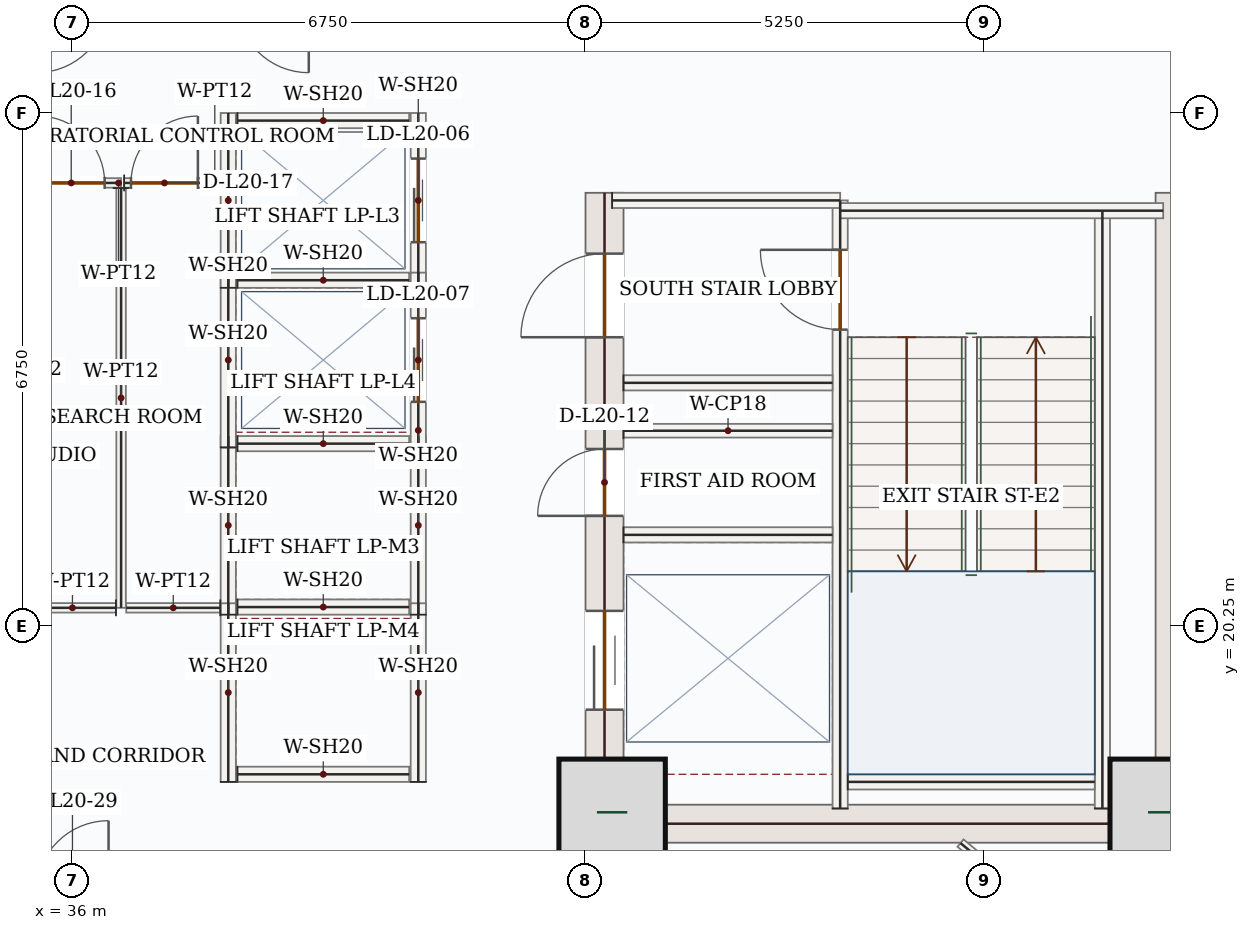
"""IFC4 building model, lengths in metres.
Left out: names, types, materials, properties, quantities, classifications, styles, units other than length and angle.
Written with IfcOpenShell. Run it as: python <this file> out.ifc"""

import sys

from ifc_helpers import new_model, si_unit, direction, frame, frame_2d, origin, origin_2d, place, context, subcontext, project, spatial, rectangle, extrude, source, transform, mapped, element, fill, save


model = new_model("IFC4")
c1 = context("Model", 3, precision=1e-05, world=origin(), true_north=direction((0.0, 1.0)))
c2 = subcontext(c1, "Body", "Model", "MODEL_VIEW")
j1 = project(units=[si_unit("LENGTHUNIT", "METRE"), si_unit("PLANEANGLEUNIT", "RADIAN")], contexts=[c1])
p1 = place(None, origin())
s1 = spatial("IfcSite", under=j1, at=p1, CompositionType="ELEMENT")
p2 = place(p1, origin())
s2 = spatial("IfcBuilding", under=s1, at=p2, CompositionType="ELEMENT")
p3 = place(p2, frame((0.0, 0.0, 92.1)))
s3 = spatial("IfcBuildingStorey", under=s2, at=p3, CompositionType="ELEMENT", Elevation=92.1)
p4 = place(p3, frame((43.0, 17.4, 0.0), z_axis=(0.0, 0.0, 1.0), x_axis=(0.0, 1.0, 0.0)))
e1 = element("IfcWall", 1, at=p4, inside=s3, PredefinedType="SHEAR", context=c2, shape_type="SweptSolid", body=[
    extrude(rectangle(XDim=8.55, YDim=0.5, at=frame_2d((4.275, 0.0))), origin(), (0.0, 0.0, 1.0), 3.95),
])
p5 = place(p4, frame((6.65, 0.0, 0.0)))
e2 = element("IfcOpeningElement", 2, at=p5, cuts=e1, PredefinedType="OPENING", context=c2, shape_type="SweptSolid", body=[
    extrude(rectangle(XDim=1.1, YDim=2.2, at=frame_2d((0.55, 1.1))), frame((0.0, 0.26, 0.0), z_axis=(0.0, -1.0, 0.0), x_axis=(1.0, 0.0, 0.0)), (0.0, 0.0, 1.0), 0.52),
])
p6 = place(p4, frame((1.75, 0.0, 0.0)))
e3 = element("IfcOpeningElement", 3, at=p6, cuts=e1, PredefinedType="OPENING", context=c2, shape_type="SweptSolid", body=[
    extrude(rectangle(XDim=1.3, YDim=2.2, at=frame_2d((0.65, 1.1))), frame((0.0, 0.26, 0.0), z_axis=(0.0, -1.0, 0.0), x_axis=(1.0, 0.0, 0.0)), (0.0, 0.0, 1.0), 0.52),
])
p7 = place(p4, frame((4.3, 0.0, 0.0)))
e4 = element("IfcOpeningElement", 4, at=p7, cuts=e1, PredefinedType="OPENING", context=c2, shape_type="SweptSolid", body=[
    extrude(rectangle(XDim=0.88, YDim=2.1, at=frame_2d((0.44, 1.05))), frame((0.0, 0.26, 0.0), z_axis=(0.0, -1.0, 0.0), x_axis=(1.0, 0.0, 0.0)), (0.0, 0.0, 1.0), 0.52),
])
m1 = source(origin(), c2, "Body", "SweptSolid", [
    extrude(rectangle(XDim=8.55, YDim=0.5, at=frame_2d((4.275, 0.0))), origin(), (0.0, 0.0, 1.0), 3.95),
])
p8 = place(p3, frame((50.5, 17.4, 0.0), z_axis=(0.0, 0.0, 1.0), x_axis=(0.0, 1.0, 0.0)))
e5 = element("IfcWall", 5, at=p8, inside=s3, PredefinedType="SHEAR", context=c2, shape_type="MappedRepresentation", body=[
    mapped(m1, transform((0.0, 0.0, 0.0), x_axis=(1.0, 0.0, 0.0), y_axis=(0.0, 1.0, 0.0), z_axis=(0.0, 0.0, 1.0), scale=1.0)),
])
m2 = source(origin(), c2, "Body", "SweptSolid", [
    extrude(rectangle(XDim=7.0, YDim=0.5, at=frame_2d((3.5, 0.0))), origin(), (0.0, 0.0, 1.0), 3.95),
])
p9 = place(p3, frame((43.25, 17.65, 0.0), z_axis=(0.0, 0.0, 1.0), x_axis=(1.0, 0.0, 0.0)))
e6 = element("IfcWall", 6, at=p9, inside=s3, PredefinedType="SHEAR", context=c2, shape_type="MappedRepresentation", body=[
    mapped(m2, transform((0.0, 0.0, 0.0), x_axis=(1.0, 0.0, 0.0), y_axis=(0.0, 1.0, 0.0), z_axis=(0.0, 0.0, 1.0), scale=1.0)),
])
m3 = source(origin(), c2, "Body", "SweptSolid", [
    extrude(rectangle(XDim=1.4, YDim=1.4, at=origin_2d()), origin(), (0.0, 0.0, 1.0), 4.2),
])
for number, where, z_axis, x_axis in (
    (7, (43.1, 17.8, 0.0), (0.0, 0.0, 1.0), (1.0, 0.0, 0.0)),
    (8, (50.35, 17.8, 0.0), (0.0, 0.0, 1.0), (1.0, 0.0, 0.0)),
):
    element("IfcColumn", number, at=place(p3, frame(where, z_axis=z_axis, x_axis=x_axis)), inside=s3, PredefinedType="COLUMN", context=c2, shape_type="MappedRepresentation", body=[
        mapped(m3, transform((0.0, 0.0, 0.0), x_axis=(1.0, 0.0, 0.0), y_axis=(0.0, 1.0, 0.0), z_axis=(0.0, 0.0, 1.0), scale=1.0)),
    ])
m4 = source(origin(), c2, "Body", "SweptSolid", [
    extrude(rectangle(XDim=5.258, YDim=0.32, at=frame_2d((2.629, 0.0))), origin(), (0.0, 0.0, 1.0), 3.95),
])
p10 = place(p3, frame((53.06, 18.458, 0.0), z_axis=(0.0, 0.0, 1.0), x_axis=(-0.707106781187, -0.707106781187, 0.0)))
e9 = element("IfcWall", 9, at=p10, inside=s3, PredefinedType="SOLIDWALL", context=c2, shape_type="MappedRepresentation", body=[
    mapped(m4, transform((0.0, 0.0, 0.0), x_axis=(1.0, 0.0, 0.0), y_axis=(0.0, 1.0, 0.0), z_axis=(0.0, 0.0, 1.0), scale=1.0)),
])
m5 = source(origin(), c2, "Body", "SweptSolid", [
    extrude(rectangle(XDim=7.87, YDim=0.2, at=frame_2d((3.935, 0.0))), origin(), (0.0, 0.0, 1.0), 3.95),
])
p11 = place(p3, frame((49.55, 17.85, 0.0), z_axis=(0.0, 0.0, 1.0), x_axis=(0.0, 1.0, 0.0)))
e10 = element("IfcWall", 10, at=p11, inside=s3, PredefinedType="SOLIDWALL", context=c2, shape_type="MappedRepresentation", body=[
    mapped(m5, transform((0.0, 0.0, 0.0), x_axis=(1.0, 0.0, 0.0), y_axis=(0.0, 1.0, 0.0), z_axis=(0.0, 0.0, 1.0), scale=1.0)),
])
p12 = place(p3, frame((46.1, 17.85, 0.0), z_axis=(0.0, 0.0, 1.0), x_axis=(0.0, 1.0, 0.0)))
e11 = element("IfcWall", 11, at=p12, inside=s3, PredefinedType="SOLIDWALL", context=c2, shape_type="SweptSolid", body=[
    extrude(rectangle(XDim=8.0, YDim=0.2, at=frame_2d((4.0, 0.0))), origin(), (0.0, 0.0, 1.0), 3.95),
])
p13 = place(p12, frame((6.3, 0.0, 0.0)))
e12 = element("IfcOpeningElement", 12, at=p13, cuts=e11, PredefinedType="OPENING", context=c2, shape_type="SweptSolid", body=[
    extrude(rectangle(XDim=1.05, YDim=2.15, at=frame_2d((0.525, 1.075))), frame((0.0, 0.11, 0.0), z_axis=(0.0, -1.0, 0.0), x_axis=(1.0, 0.0, 0.0)), (0.0, 0.0, 1.0), 0.22),
])
m6 = source(origin(), c2, "Body", "SweptSolid", [
    extrude(rectangle(XDim=3.0, YDim=0.2, at=frame_2d((1.5, 0.0))), origin(), (0.0, 0.0, 1.0), 3.95),
])
p14 = place(p3, frame((43.1, 25.85, 0.0), z_axis=(0.0, 0.0, 1.0), x_axis=(1.0, 0.0, 0.0)))
e13 = element("IfcWall", 13, at=p14, inside=s3, PredefinedType="SOLIDWALL", context=c2, shape_type="MappedRepresentation", body=[
    mapped(m6, transform((0.0, 0.0, 0.0), x_axis=(1.0, 0.0, 0.0), y_axis=(0.0, 1.0, 0.0), z_axis=(0.0, 0.0, 1.0), scale=1.0)),
])
m7 = source(origin(), c2, "Body", "SweptSolid", [
    extrude(rectangle(XDim=4.25, YDim=0.2, at=frame_2d((2.125, 0.0))), origin(), (0.0, 0.0, 1.0), 3.95),
])
p15 = place(p3, frame((46.1, 25.715, 0.0), z_axis=(0.0, 0.0, 1.0), x_axis=(1.0, 0.0, 0.0)))
e14 = element("IfcWall", 14, at=p15, inside=s3, PredefinedType="SOLIDWALL", context=c2, shape_type="MappedRepresentation", body=[
    mapped(m7, transform((0.0, 0.0, 0.0), x_axis=(1.0, 0.0, 0.0), y_axis=(0.0, 1.0, 0.0), z_axis=(0.0, 0.0, 1.0), scale=1.0)),
])
m8 = source(origin(), c2, "Body", "SweptSolid", [
    extrude(rectangle(XDim=3.25, YDim=0.2, at=frame_2d((1.625, 0.0))), origin(), (0.0, 0.0, 1.0), 3.95),
])
p16 = place(p3, frame((46.2, 18.2, 0.0), z_axis=(0.0, 0.0, 1.0), x_axis=(1.0, 0.0, 0.0)))
e15 = element("IfcWall", 15, at=p16, inside=s3, PredefinedType="SOLIDWALL", context=c2, shape_type="MappedRepresentation", body=[
    mapped(m8, transform((0.0, 0.0, 0.0), x_axis=(1.0, 0.0, 0.0), y_axis=(0.0, 1.0, 0.0), z_axis=(0.0, 0.0, 1.0), scale=1.0)),
])
m9 = source(origin(), c2, "Body", "SweptSolid", [
    extrude(rectangle(XDim=2.75, YDim=0.2, at=frame_2d((1.375, 0.0))), origin(), (0.0, 0.0, 1.0), 3.95),
])
for number, where, z_axis, x_axis in (
    (16, (43.25, 23.45, 0.0), (0.0, 0.0, 1.0), (1.0, 0.0, 0.0)),
    (17, (43.25, 21.45, 0.0), (0.0, 0.0, 1.0), (1.0, 0.0, 0.0)),
):
    element("IfcWall", number, at=place(p3, frame(where, z_axis=z_axis, x_axis=x_axis)), inside=s3, PredefinedType="SOLIDWALL", context=c2, shape_type="MappedRepresentation", body=[
        mapped(m9, transform((0.0, 0.0, 0.0), x_axis=(1.0, 0.0, 0.0), y_axis=(0.0, 1.0, 0.0), z_axis=(0.0, 0.0, 1.0), scale=1.0)),
    ])
m10 = source(origin(), c2, "Body", "SweptSolid", [
    extrude(rectangle(XDim=2.75, YDim=0.18, at=frame_2d((1.375, 0.0))), origin(), (0.0, 0.0, 1.0), 3.95),
])
p17 = place(p3, frame((43.25, 22.82, 0.0), z_axis=(0.0, 0.0, 1.0), x_axis=(1.0, 0.0, 0.0)))
e18 = element("IfcWall", 18, at=p17, inside=s3, PredefinedType="PARTITIONING", context=c2, shape_type="MappedRepresentation", body=[
    mapped(m10, transform((0.0, 0.0, 0.0), x_axis=(1.0, 0.0, 0.0), y_axis=(0.0, 1.0, 0.0), z_axis=(0.0, 0.0, 1.0), scale=1.0)),
])
m11 = source(origin(), c2, "Body", "SweptSolid", [
    extrude(rectangle(XDim=2.35, YDim=0.2, at=frame_2d((1.175, 0.0))), origin(), (0.0, 0.0, 1.0), 3.95),
])
for number, where, z_axis, x_axis in (
    (19, (38.05, 20.4, 0.0), (0.0, 0.0, 1.0), (0.0, 1.0, 0.0)),
    (20, (40.55, 20.4, 0.0), (0.0, 0.0, 1.0), (0.0, 1.0, 0.0)),
):
    element("IfcWall", number, at=place(p3, frame(where, z_axis=z_axis, x_axis=x_axis)), inside=s3, PredefinedType="SOLIDWALL", context=c2, shape_type="MappedRepresentation", body=[
        mapped(m11, transform((0.0, 0.0, 0.0), x_axis=(1.0, 0.0, 0.0), y_axis=(0.0, 1.0, 0.0), z_axis=(0.0, 0.0, 1.0), scale=1.0)),
    ])
m12 = source(origin(), c2, "Body", "SweptSolid", [
    extrude(rectangle(XDim=2.26, YDim=0.2, at=frame_2d((1.13, 0.0))), origin(), (0.0, 0.0, 1.0), 3.95),
])
for number, where, z_axis, x_axis in (
    (21, (38.17, 20.5, 0.0), (0.0, 0.0, 1.0), (1.0, 0.0, 0.0)),
    (22, (38.17, 22.65, 0.0), (0.0, 0.0, 1.0), (1.0, 0.0, 0.0)),
):
    element("IfcWall", number, at=place(p3, frame(where, z_axis=z_axis, x_axis=x_axis)), inside=s3, PredefinedType="SOLIDWALL", context=c2, shape_type="MappedRepresentation", body=[
        mapped(m12, transform((0.0, 0.0, 0.0), x_axis=(1.0, 0.0, 0.0), y_axis=(0.0, 1.0, 0.0), z_axis=(0.0, 0.0, 1.0), scale=1.0)),
    ])
for number, where, z_axis, x_axis in (
    (23, (38.05, 18.2, 0.0), (0.0, 0.0, 1.0), (0.0, 1.0, 0.0)),
    (24, (40.55, 18.2, 0.0), (0.0, 0.0, 1.0), (0.0, 1.0, 0.0)),
):
    element("IfcWall", number, at=place(p3, frame(where, z_axis=z_axis, x_axis=x_axis)), inside=s3, PredefinedType="SOLIDWALL", context=c2, shape_type="MappedRepresentation", body=[
        mapped(m11, transform((0.0, 0.0, 0.0), x_axis=(1.0, 0.0, 0.0), y_axis=(0.0, 1.0, 0.0), z_axis=(0.0, 0.0, 1.0), scale=1.0)),
    ])
p18 = place(p3, frame((38.17, 18.3, 0.0), z_axis=(0.0, 0.0, 1.0), x_axis=(1.0, 0.0, 0.0)))
e25 = element("IfcWall", 25, at=p18, inside=s3, PredefinedType="SOLIDWALL", context=c2, shape_type="MappedRepresentation", body=[
    mapped(m12, transform((0.0, 0.0, 0.0), x_axis=(1.0, 0.0, 0.0), y_axis=(0.0, 1.0, 0.0), z_axis=(0.0, 0.0, 1.0), scale=1.0)),
])
m13 = source(origin(), c2, "Body", "SweptSolid", [
    extrude(rectangle(XDim=2.3, YDim=0.2, at=frame_2d((1.15, 0.0))), origin(), (0.0, 0.0, 1.0), 3.95),
])
p19 = place(p3, frame((38.05, 24.7, 0.0), z_axis=(0.0, 0.0, 1.0), x_axis=(0.0, 1.0, 0.0)))
e26 = element("IfcWall", 26, at=p19, inside=s3, PredefinedType="SOLIDWALL", context=c2, shape_type="MappedRepresentation", body=[
    mapped(m13, transform((0.0, 0.0, 0.0), x_axis=(1.0, 0.0, 0.0), y_axis=(0.0, 1.0, 0.0), z_axis=(0.0, 0.0, 1.0), scale=1.0)),
])
p20 = place(p3, frame((40.55, 24.7, 0.0), z_axis=(0.0, 0.0, 1.0), x_axis=(0.0, 1.0, 0.0)))
e27 = element("IfcWall", 27, at=p20, inside=s3, PredefinedType="SOLIDWALL", context=c2, shape_type="SweptSolid", body=[
    extrude(rectangle(XDim=2.3, YDim=0.2, at=frame_2d((1.15, 0.0))), origin(), (0.0, 0.0, 1.0), 3.95),
])
p21 = place(p20, frame((0.6, 0.0, 0.0)))
e28 = element("IfcOpeningElement", 28, at=p21, cuts=e27, PredefinedType="OPENING", context=c2, shape_type="SweptSolid", body=[
    extrude(rectangle(XDim=1.1, YDim=2.15, at=frame_2d((0.55, 1.075))), frame((0.0, 0.11, 0.0), z_axis=(0.0, -1.0, 0.0), x_axis=(1.0, 0.0, 0.0)), (0.0, 0.0, 1.0), 0.22),
])
for number, where, z_axis, x_axis in (
    (29, (38.17, 24.8, 0.0), (0.0, 0.0, 1.0), (1.0, 0.0, 0.0)),
    (30, (38.17, 26.9, 0.0), (0.0, 0.0, 1.0), (1.0, 0.0, 0.0)),
):
    element("IfcWall", number, at=place(p3, frame(where, z_axis=z_axis, x_axis=x_axis)), inside=s3, PredefinedType="SOLIDWALL", context=c2, shape_type="MappedRepresentation", body=[
        mapped(m12, transform((0.0, 0.0, 0.0), x_axis=(1.0, 0.0, 0.0), y_axis=(0.0, 1.0, 0.0), z_axis=(0.0, 0.0, 1.0), scale=1.0)),
    ])
m14 = source(origin(), c2, "Body", "SweptSolid", [
    extrude(rectangle(XDim=2.3, YDim=0.2, at=frame_2d((1.15, 0.0))), origin(), (0.0, 0.0, 1.0), 3.95),
])
p22 = place(p3, frame((38.05, 22.6, 0.0), z_axis=(0.0, 0.0, 1.0), x_axis=(0.0, 1.0, 0.0)))
e31 = element("IfcWall", 31, at=p22, inside=s3, PredefinedType="SOLIDWALL", context=c2, shape_type="MappedRepresentation", body=[
    mapped(m14, transform((0.0, 0.0, 0.0), x_axis=(1.0, 0.0, 0.0), y_axis=(0.0, 1.0, 0.0), z_axis=(0.0, 0.0, 1.0), scale=1.0)),
])
p23 = place(p3, frame((40.55, 22.6, 0.0), z_axis=(0.0, 0.0, 1.0), x_axis=(0.0, 1.0, 0.0)))
e32 = element("IfcWall", 32, at=p23, inside=s3, PredefinedType="SOLIDWALL", context=c2, shape_type="SweptSolid", body=[
    extrude(rectangle(XDim=2.3, YDim=0.2, at=frame_2d((1.15, 0.0))), origin(), (0.0, 0.0, 1.0), 3.95),
])
p24 = place(p23, frame((0.6, 0.0, 0.0)))
e33 = element("IfcOpeningElement", 33, at=p24, cuts=e32, PredefinedType="OPENING", context=c2, shape_type="SweptSolid", body=[
    extrude(rectangle(XDim=1.1, YDim=2.15, at=frame_2d((0.55, 1.075))), frame((0.0, 0.11, 0.0), z_axis=(0.0, -1.0, 0.0), x_axis=(1.0, 0.0, 0.0)), (0.0, 0.0, 1.0), 0.22),
])
p25 = place(p3, frame((35.427, 26.08, 0.0), z_axis=(0.0, 0.0, 1.0), x_axis=(1.0, 0.0, 0.0)))
e34 = element("IfcWall", 34, at=p25, inside=s3, PredefinedType="PARTITIONING", context=c2, shape_type="SweptSolid", body=[
    extrude(rectangle(XDim=1.212, YDim=0.125, at=frame_2d((0.606, 0.0))), origin(), (0.0, 0.0, 1.0), 3.95),
])
p26 = place(p25, frame((0.116, 0.0, 0.0)))
e35 = element("IfcOpeningElement", 35, at=p26, cuts=e34, PredefinedType="OPENING", context=c2, shape_type="SweptSolid", body=[
    extrude(rectangle(XDim=0.88, YDim=2.1, at=frame_2d((0.44, 1.05))), frame((0.0, 0.073, 0.0), z_axis=(0.0, -1.0, 0.0), x_axis=(1.0, 0.0, 0.0)), (0.0, 0.0, 1.0), 0.145),
])
m15 = source(origin(), c2, "Body", "SweptSolid", [
    extrude(rectangle(XDim=5.522, YDim=0.125, at=frame_2d((2.761, 0.0))), origin(), (0.0, 0.0, 1.0), 3.95),
])
p27 = place(p3, frame((36.64, 26.012, 0.0), z_axis=(0.0, 0.0, 1.0), x_axis=(0.0, -1.0, 0.0)))
e36 = element("IfcWall", 36, at=p27, inside=s3, PredefinedType="PARTITIONING", context=c2, shape_type="MappedRepresentation", body=[
    mapped(m15, transform((0.0, 0.0, 0.0), x_axis=(1.0, 0.0, 0.0), y_axis=(0.0, 1.0, 0.0), z_axis=(0.0, 0.0, 1.0), scale=1.0)),
])
m16 = source(origin(), c2, "Body", "SweptSolid", [
    extrude(rectangle(XDim=1.145, YDim=0.125, at=frame_2d((0.573, 0.0))), origin(), (0.0, 0.0, 1.0), 3.95),
])
p28 = place(p3, frame((36.573, 20.49, 0.0), z_axis=(0.0, 0.0, 1.0), x_axis=(-1.0, 0.0, 0.0)))
e37 = element("IfcWall", 37, at=p28, inside=s3, PredefinedType="PARTITIONING", context=c2, shape_type="MappedRepresentation", body=[
    mapped(m16, transform((0.0, 0.0, 0.0), x_axis=(1.0, 0.0, 0.0), y_axis=(0.0, 1.0, 0.0), z_axis=(0.0, 0.0, 1.0), scale=1.0)),
])
p29 = place(p3, frame((36.68, 26.08, 0.0), z_axis=(0.0, 0.0, 1.0), x_axis=(1.0, 0.0, 0.0)))
e38 = element("IfcWall", 38, at=p29, inside=s3, PredefinedType="PARTITIONING", context=c2, shape_type="SweptSolid", body=[
    extrude(rectangle(XDim=1.265, YDim=0.125, at=frame_2d((0.633, 0.0))), origin(), (0.0, 0.0, 1.0), 3.95),
])
p30 = place(p29, frame((0.09, 0.0, 0.0)))
e39 = element("IfcOpeningElement", 39, at=p30, cuts=e38, PredefinedType="OPENING", context=c2, shape_type="SweptSolid", body=[
    extrude(rectangle(XDim=0.88, YDim=2.1, at=frame_2d((0.44, 1.05))), frame((0.0, 0.073, 0.0), z_axis=(0.0, -1.0, 0.0), x_axis=(1.0, 0.0, 0.0)), (0.0, 0.0, 1.0), 0.145),
])
m17 = source(origin(), c2, "Body", "SweptSolid", [
    extrude(rectangle(XDim=1.238, YDim=0.125, at=frame_2d((0.619, 0.0))), origin(), (0.0, 0.0, 1.0), 3.95),
])
p31 = place(p3, frame((37.945, 20.49, 0.0), z_axis=(0.0, 0.0, 1.0), x_axis=(-1.0, 0.0, 0.0)))
e40 = element("IfcWall", 40, at=p31, inside=s3, PredefinedType="PARTITIONING", context=c2, shape_type="MappedRepresentation", body=[
    mapped(m17, transform((0.0, 0.0, 0.0), x_axis=(1.0, 0.0, 0.0), y_axis=(0.0, 1.0, 0.0), z_axis=(0.0, 0.0, 1.0), scale=1.0)),
])
m18 = source(origin(), c2, "Body", "SweptSolid", [
    extrude(rectangle(XDim=2.898, YDim=0.125, at=frame_2d((1.449, 0.0))), origin(), (0.0, 0.0, 1.0), 3.95),
])
p32 = place(p3, frame((49.917, 15.549, 0.0), z_axis=(0.0, 0.0, 1.0), x_axis=(-0.770859236659, 0.637005523726, 0.0)))
e41 = element("IfcWall", 41, at=p32, inside=s3, PredefinedType="PARTITIONING", context=c2, shape_type="MappedRepresentation", body=[
    mapped(m18, transform((0.0, 0.0, 0.0), x_axis=(1.0, 0.0, 0.0), y_axis=(0.0, 1.0, 0.0), z_axis=(0.0, 0.0, 1.0), scale=1.0)),
])
m19 = source(origin(), c2, "Body", "SweptSolid", [
    extrude(rectangle(XDim=1.05, YDim=2.15, at=frame_2d((0.525, 1.075))), frame((0.0, 0.025, 0.0), z_axis=(0.0, -1.0, 0.0), x_axis=(1.0, 0.0, 0.0)), (0.0, 0.0, 1.0), 0.05),
])
p33 = place(p13, origin())
e42 = element("IfcDoor", 42, at=p33, inside=s3, OperationType="SINGLE_SWING_RIGHT", PredefinedType="DOOR", context=c2, shape_type="MappedRepresentation", body=[
    mapped(m19, transform((0.0, 0.0, 0.0), x_axis=(1.0, 0.0, 0.0), y_axis=(0.0, 1.0, 0.0), z_axis=(0.0, 0.0, 1.0), scale=1.0)),
])
fill(e12, e42)
m20 = source(origin(), c2, "Body", "SweptSolid", [
    extrude(rectangle(XDim=1.1, YDim=2.2, at=frame_2d((0.55, 1.1))), frame((0.0, 0.025, 0.0), z_axis=(0.0, -1.0, 0.0), x_axis=(1.0, 0.0, 0.0)), (0.0, 0.0, 1.0), 0.05),
])
p34 = place(p5, origin())
e43 = element("IfcDoor", 43, at=p34, inside=s3, OperationType="SINGLE_SWING_LEFT", PredefinedType="DOOR", context=c2, shape_type="MappedRepresentation", body=[
    mapped(m20, transform((0.0, 0.0, 0.0), x_axis=(1.0, 0.0, 0.0), y_axis=(0.0, 1.0, 0.0), z_axis=(0.0, 0.0, 1.0), scale=1.0)),
])
fill(e2, e43)
m21 = source(origin(), c2, "Body", "SweptSolid", [
    extrude(rectangle(XDim=1.3, YDim=2.2, at=frame_2d((0.65, 1.1))), frame((0.0, 0.025, 0.0), z_axis=(0.0, -1.0, 0.0), x_axis=(1.0, 0.0, 0.0)), (0.0, 0.0, 1.0), 0.05),
])
p35 = place(p6, origin())
e44 = element("IfcDoor", 44, at=p35, inside=s3, OperationType="DOUBLE_DOOR_SLIDING", PredefinedType="DOOR", context=c2, shape_type="MappedRepresentation", body=[
    mapped(m21, transform((0.0, 0.0, 0.0), x_axis=(1.0, 0.0, 0.0), y_axis=(0.0, 1.0, 0.0), z_axis=(0.0, 0.0, 1.0), scale=1.0)),
])
fill(e3, e44)
m22 = source(origin(), c2, "Body", "SweptSolid", [
    extrude(rectangle(XDim=0.88, YDim=2.1, at=frame_2d((0.44, 1.05))), frame((0.0, 0.025, 0.0), z_axis=(0.0, -1.0, 0.0), x_axis=(1.0, 0.0, 0.0)), (0.0, 0.0, 1.0), 0.05),
])
p36 = place(p7, origin())
e45 = element("IfcDoor", 45, at=p36, inside=s3, OperationType="SINGLE_SWING_LEFT", PredefinedType="DOOR", context=c2, shape_type="MappedRepresentation", body=[
    mapped(m22, transform((0.0, 0.0, 0.0), x_axis=(1.0, 0.0, 0.0), y_axis=(0.0, 1.0, 0.0), z_axis=(0.0, 0.0, 1.0), scale=1.0)),
])
fill(e4, e45)
m23 = source(origin(), c2, "Body", "SweptSolid", [
    extrude(rectangle(XDim=1.1, YDim=2.15, at=frame_2d((0.55, 1.075))), frame((0.0, 0.025, 0.0), z_axis=(0.0, -1.0, 0.0), x_axis=(1.0, 0.0, 0.0)), (0.0, 0.0, 1.0), 0.05),
])
p37 = place(p21, origin())
e46 = element("IfcDoor", 46, at=p37, inside=s3, OperationType="DOUBLE_DOOR_SLIDING", PredefinedType="DOOR", context=c2, shape_type="MappedRepresentation", body=[
    mapped(m23, transform((0.0, 0.0, 0.0), x_axis=(1.0, 0.0, 0.0), y_axis=(0.0, 1.0, 0.0), z_axis=(0.0, 0.0, 1.0), scale=1.0)),
])
fill(e28, e46)
p38 = place(p24, origin())
e47 = element("IfcDoor", 47, at=p38, inside=s3, OperationType="DOUBLE_DOOR_SLIDING", PredefinedType="DOOR", context=c2, shape_type="MappedRepresentation", body=[
    mapped(m23, transform((0.0, 0.0, 0.0), x_axis=(1.0, 0.0, 0.0), y_axis=(0.0, 1.0, 0.0), z_axis=(0.0, 0.0, 1.0), scale=1.0)),
])
fill(e33, e47)
p39 = place(p26, origin())
e48 = element("IfcDoor", 48, at=p39, inside=s3, OperationType="SINGLE_SWING_LEFT", PredefinedType="DOOR", context=c2, shape_type="MappedRepresentation", body=[
    mapped(m22, transform((0.0, 0.0, 0.0), x_axis=(1.0, 0.0, 0.0), y_axis=(0.0, 1.0, 0.0), z_axis=(0.0, 0.0, 1.0), scale=1.0)),
])
fill(e35, e48)
p40 = place(p30, origin())
e49 = element("IfcDoor", 49, at=p40, inside=s3, OperationType="SINGLE_SWING_RIGHT", PredefinedType="DOOR", context=c2, shape_type="MappedRepresentation", body=[
    mapped(m22, transform((0.0, 0.0, 0.0), x_axis=(1.0, 0.0, 0.0), y_axis=(0.0, 1.0, 0.0), z_axis=(0.0, 0.0, 1.0), scale=1.0)),
])
fill(e39, e49)
save(model, sys.argv[1])
